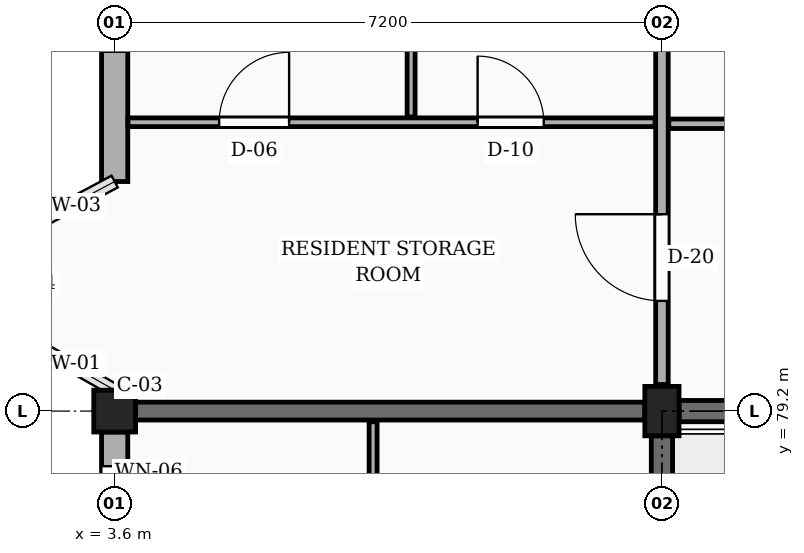
"""IFC4 building model, lengths in metres.
Left out: names, types, materials, properties, quantities, classifications, styles, units other than length and angle.
Written with IfcOpenShell. Run it as: python <this file> out.ifc"""

import sys

from ifc_helpers import new_model, si_unit, direction, frame, frame_2d, origin, origin_2d, place, context, subcontext, project, spatial, rectangle, extrude, element, fill, save


model = new_model("IFC4")
c1 = context("Model", 3, precision=1e-05, world=origin(), true_north=direction((0.0, 1.0)))
c2 = subcontext(c1, "Body", "Model", "MODEL_VIEW")
j1 = project(units=[si_unit("LENGTHUNIT", "METRE"), si_unit("PLANEANGLEUNIT", "RADIAN")], contexts=[c1])
p1 = place(None, origin())
s1 = spatial("IfcSite", under=j1, at=p1, CompositionType="ELEMENT")
p2 = place(p1, origin())
s2 = spatial("IfcBuilding", under=s1, at=p2, CompositionType="ELEMENT")
p3 = place(p2, frame((0.0, 0.0, 13.95)))
s3 = spatial("IfcBuildingStorey", under=s2, at=p3, CompositionType="ELEMENT", Elevation=13.95)
p4 = place(p3, frame((3.6, 79.2, 0.0), z_axis=(0.0, 0.0, 1.0), x_axis=(1.0, 0.0, 0.0)))
e1 = element("IfcColumn", 1, at=p4, inside=s3, PredefinedType="COLUMN", context=c2, shape_type="SweptSolid", body=[
    extrude(rectangle(XDim=0.55, YDim=0.55, at=origin_2d()), origin(), (0.0, 0.0, 1.0), 3.15),
])
p5 = place(p3, frame((10.8, 79.2, 0.0), z_axis=(0.0, 0.0, 1.0), x_axis=(1.0, 0.0, 0.0)))
e2 = element("IfcColumn", 2, at=p5, inside=s3, PredefinedType="COLUMN", context=c2, shape_type="SweptSolid", body=[
    extrude(rectangle(XDim=0.45, YDim=0.65, at=origin_2d()), origin(), (0.0, 0.0, 1.0), 3.15),
])
p6 = place(p3, frame((3.875, 79.2, 0.0), z_axis=(0.0, 0.0, 1.0), x_axis=(1.0, 0.0, 0.0)))
e3 = element("IfcWall", 3, at=p6, inside=s3, PredefinedType="SOLIDWALL", context=c2, shape_type="SweptSolid", body=[
    extrude(rectangle(XDim=6.7, YDim=0.235, at=frame_2d((3.35, 0.0))), origin(), (0.0, 0.0, 1.0), 2.21),
])
p7 = place(p3, frame((3.6, 86.125, 0.0), z_axis=(0.0, 0.0, 1.0), x_axis=(0.0, -1.0, 0.0)))
e4 = element("IfcWall", 4, at=p7, inside=s3, PredefinedType="SOLIDWALL", context=c2, shape_type="SweptSolid", body=[
    extrude(rectangle(XDim=3.905, YDim=0.345, at=frame_2d((1.953, 0.0))), origin(), (0.0, 0.0, 1.0), 2.48),
])
p8 = place(p7, frame((1.038, 0.0, 0.78)))
e5 = element("IfcOpeningElement", 5, at=p8, cuts=e4, PredefinedType="OPENING", context=c2, shape_type="SweptSolid", body=[
    extrude(rectangle(XDim=1.16, YDim=1.15, at=frame_2d((0.58, 0.575))), frame((0.0, 0.183, 0.0), z_axis=(0.0, -1.0, 0.0), x_axis=(1.0, 0.0, 0.0)), (0.0, 0.0, 1.0), 0.365),
])
p9 = place(p3, frame((3.6, 78.925, 0.0), z_axis=(0.0, 0.0, 1.0), x_axis=(0.0, -1.0, 0.0)))
e6 = element("IfcWall", 6, at=p9, inside=s3, PredefinedType="SOLIDWALL", context=c2, shape_type="SweptSolid", body=[
    extrude(rectangle(XDim=6.65, YDim=0.345, at=frame_2d((3.325, 0.0))), origin(), (0.0, 0.0, 1.0), 2.48),
])
p10 = place(p9, frame((0.45, 0.0, 0.78)))
e7 = element("IfcOpeningElement", 7, at=p10, cuts=e6, PredefinedType="OPENING", context=c2, shape_type="SweptSolid", body=[
    extrude(rectangle(XDim=1.24, YDim=1.15, at=frame_2d((0.62, 0.575))), frame((0.0, 0.183, 0.0), z_axis=(0.0, -1.0, 0.0), x_axis=(1.0, 0.0, 0.0)), (0.0, 0.0, 1.0), 0.365),
])
p11 = place(p9, frame((4.65, 0.0, 0.78)))
e8 = element("IfcOpeningElement", 8, at=p11, cuts=e6, PredefinedType="OPENING", context=c2, shape_type="SweptSolid", body=[
    extrude(rectangle(XDim=1.4, YDim=1.15, at=frame_2d((0.7, 0.575))), frame((0.0, 0.183, 0.0), z_axis=(0.0, -1.0, 0.0), x_axis=(1.0, 0.0, 0.0)), (0.0, 0.0, 1.0), 0.365),
])
p12 = place(p3, frame((10.8, 72.325, 0.0), z_axis=(0.0, 0.0, 1.0), x_axis=(0.0, 1.0, 0.0)))
e9 = element("IfcWall", 9, at=p12, inside=s3, PredefinedType="SHEAR", context=c2, shape_type="SweptSolid", body=[
    extrude(rectangle(XDim=6.55, YDim=0.28, at=frame_2d((3.275, 0.0))), origin(), (0.0, 0.0, 1.0), 2.91),
])
p13 = place(p3, frame((11.025, 79.2, 0.0), z_axis=(0.0, 0.0, 1.0), x_axis=(1.0, 0.0, 0.0)))
e10 = element("IfcWall", 10, at=p13, inside=s3, PredefinedType="SHEAR", context=c2, shape_type="SweptSolid", body=[
    extrude(rectangle(XDim=6.75, YDim=0.28, at=frame_2d((3.375, 0.0))), origin(), (0.0, 0.0, 1.0), 2.91),
])
p14 = place(p3, frame((10.8, 79.55, 0.0), z_axis=(0.0, 0.0, 1.0), x_axis=(0.0, 1.0, 0.0)))
e11 = element("IfcWall", 11, at=p14, inside=s3, PredefinedType="PARTITIONING", context=c2, shape_type="SweptSolid", body=[
    extrude(rectangle(XDim=6.5, YDim=0.165, at=frame_2d((3.25, 0.0))), origin(), (0.0, 0.0, 1.0), 2.345),
])
p15 = place(p14, frame((1.1, 0.0, 0.0)))
e12 = element("IfcOpeningElement", 12, at=p15, cuts=e11, PredefinedType="OPENING", context=c2, shape_type="SweptSolid", body=[
    extrude(rectangle(XDim=1.14, YDim=2.18, at=frame_2d((0.57, 1.09))), frame((0.0, 0.093, 0.0), z_axis=(0.0, -1.0, 0.0), x_axis=(1.0, 0.0, 0.0)), (0.0, 0.0, 1.0), 0.185),
])
p16 = place(p3, frame((7.0, 75.37, 0.0), z_axis=(0.0, 0.0, 1.0), x_axis=(0.0, 1.0, 0.0)))
e13 = element("IfcWall", 13, at=p16, inside=s3, PredefinedType="PARTITIONING", context=c2, shape_type="SweptSolid", body=[
    extrude(rectangle(XDim=3.69, YDim=0.105, at=frame_2d((1.845, 0.0))), origin(), (0.0, 0.0, 1.0), 2.345),
])
p17 = place(p3, frame((10.89, 82.98, 0.0), z_axis=(0.0, 0.0, 1.0), x_axis=(1.0, 0.0, 0.0)))
e14 = element("IfcWall", 14, at=p17, inside=s3, PredefinedType="PARTITIONING", context=c2, shape_type="SweptSolid", body=[
    extrude(rectangle(XDim=7.02, YDim=0.125, at=frame_2d((3.51, 0.0))), origin(), (0.0, 0.0, 1.0), 2.345),
])
p18 = place(p17, frame((2.85, 0.0, 0.0)))
e15 = element("IfcOpeningElement", 15, at=p18, cuts=e14, PredefinedType="OPENING", context=c2, shape_type="SweptSolid", body=[
    extrude(rectangle(XDim=1.02, YDim=2.15, at=frame_2d((0.51, 1.075))), frame((0.0, 0.073, 0.0), z_axis=(0.0, -1.0, 0.0), x_axis=(1.0, 0.0, 0.0)), (0.0, 0.0, 1.0), 0.145),
])
p19 = place(p3, frame((3.775, 83.0, 0.0), z_axis=(0.0, 0.0, 1.0), x_axis=(1.0, 0.0, 0.0)))
e16 = element("IfcWall", 16, at=p19, inside=s3, PredefinedType="PARTITIONING", context=c2, shape_type="SweptSolid", body=[
    extrude(rectangle(XDim=6.935, YDim=0.115, at=frame_2d((3.468, 0.0))), origin(), (0.0, 0.0, 1.0), 2.345),
])
p20 = place(p19, frame((4.6, 0.0, 0.0)))
e17 = element("IfcOpeningElement", 17, at=p20, cuts=e16, PredefinedType="OPENING", context=c2, shape_type="SweptSolid", body=[
    extrude(rectangle(XDim=0.87, YDim=2.05, at=frame_2d((0.435, 1.025))), frame((0.0, 0.067, 0.0), z_axis=(0.0, -1.0, 0.0), x_axis=(1.0, 0.0, 0.0)), (0.0, 0.0, 1.0), 0.135),
])
p21 = place(p19, frame((1.2, 0.0, 0.0)))
e18 = element("IfcOpeningElement", 18, at=p21, cuts=e16, PredefinedType="OPENING", context=c2, shape_type="SweptSolid", body=[
    extrude(rectangle(XDim=0.92, YDim=2.1, at=frame_2d((0.46, 1.05))), frame((0.0, 0.067, 0.0), z_axis=(0.0, -1.0, 0.0), x_axis=(1.0, 0.0, 0.0)), (0.0, 0.0, 1.0), 0.135),
])
p22 = place(p3, frame((7.5, 83.07, 0.0), z_axis=(0.0, 0.0, 1.0), x_axis=(0.0, 1.0, 0.0)))
e19 = element("IfcWall", 19, at=p22, inside=s3, PredefinedType="PARTITIONING", context=c2, shape_type="SweptSolid", body=[
    extrude(rectangle(XDim=3.19, YDim=0.105, at=frame_2d((1.595, 0.0))), origin(), (0.0, 0.0, 1.0), 2.345),
])
p23 = place(p10, origin())
e20 = element("IfcWindow", 20, at=p23, inside=s3, PartitioningType="SINGLE_PANEL", PredefinedType="WINDOW", context=c2, shape_type="SweptSolid", body=[
    extrude(rectangle(XDim=1.24, YDim=1.15, at=frame_2d((0.62, 0.575))), frame((0.0, 0.03, 0.0), z_axis=(0.0, -1.0, 0.0), x_axis=(1.0, 0.0, 0.0)), (0.0, 0.0, 1.0), 0.06),
])
fill(e7, e20)
p24 = place(p15, origin())
e21 = element("IfcDoor", 21, at=p24, inside=s3, OperationType="SINGLE_SWING_RIGHT", PredefinedType="DOOR", context=c2, shape_type="SweptSolid", body=[
    extrude(rectangle(XDim=1.14, YDim=2.18, at=frame_2d((0.57, 1.09))), frame((0.0, 0.025, 0.0), z_axis=(0.0, -1.0, 0.0), x_axis=(1.0, 0.0, 0.0)), (0.0, 0.0, 1.0), 0.05),
])
fill(e12, e21)
p25 = place(p20, origin())
e22 = element("IfcDoor", 22, at=p25, inside=s3, OperationType="SINGLE_SWING_LEFT", PredefinedType="DOOR", context=c2, shape_type="SweptSolid", body=[
    extrude(rectangle(XDim=0.87, YDim=2.05, at=frame_2d((0.435, 1.025))), frame((0.0, 0.025, 0.0), z_axis=(0.0, -1.0, 0.0), x_axis=(1.0, 0.0, 0.0)), (0.0, 0.0, 1.0), 0.05),
])
fill(e17, e22)
p26 = place(p21, origin())
e23 = element("IfcDoor", 23, at=p26, inside=s3, OperationType="SINGLE_SWING_RIGHT", PredefinedType="DOOR", context=c2, shape_type="SweptSolid", body=[
    extrude(rectangle(XDim=0.92, YDim=2.1, at=frame_2d((0.46, 1.05))), frame((0.0, 0.025, 0.0), z_axis=(0.0, -1.0, 0.0), x_axis=(1.0, 0.0, 0.0)), (0.0, 0.0, 1.0), 0.05),
])
fill(e18, e23)
save(model, sys.argv[1])
